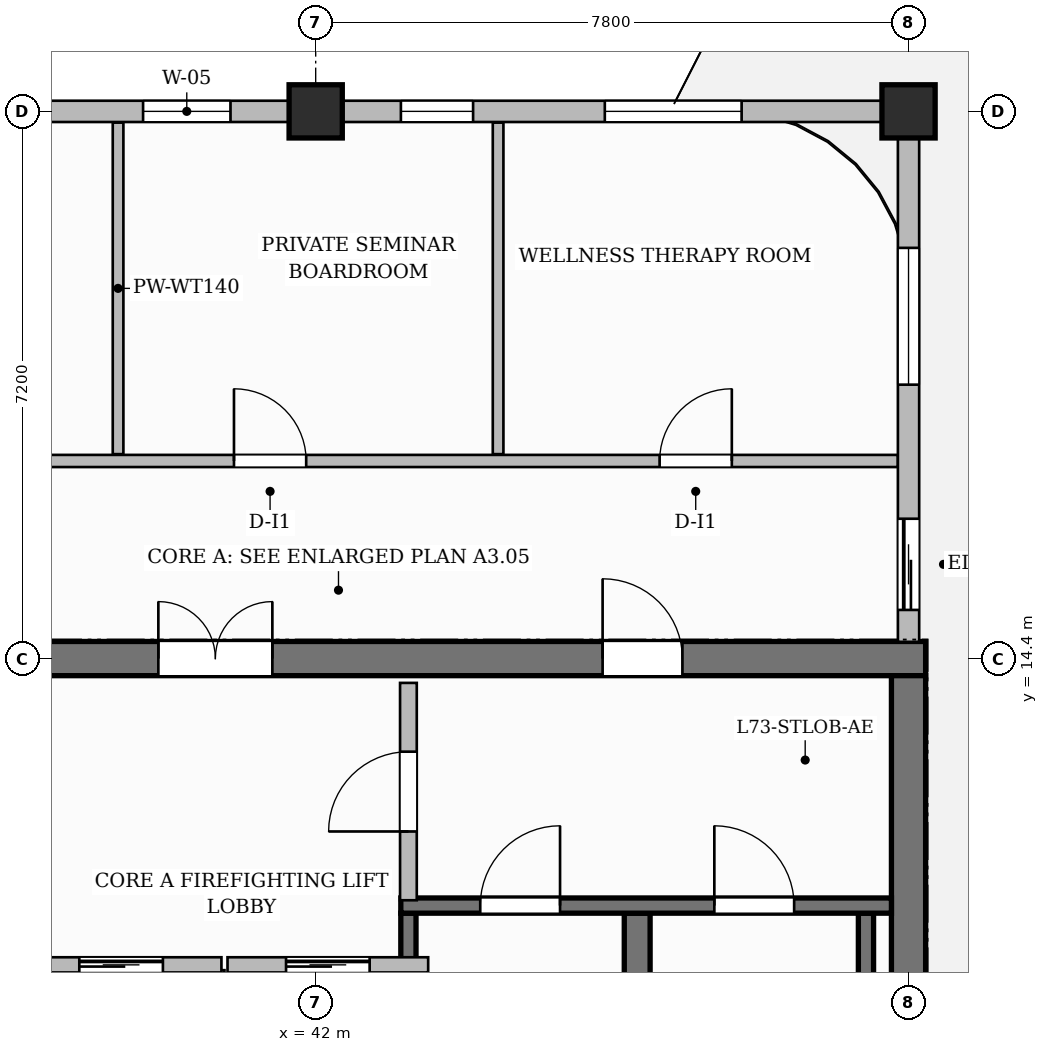
"""IFC4 building model, lengths in metres.
Left out: names, types, materials, properties, quantities, classifications, styles, units other than length and angle.
Written with IfcOpenShell. Run it as: python <this file> out.ifc"""

import sys

from ifc_helpers import new_model, si_unit, direction, frame, frame_2d, origin, origin_2d, place, context, subcontext, project, spatial, rectangle, extrude, source, transform, mapped, element, fill, save


model = new_model("IFC4")
c1 = context("Model", 3, precision=1e-05, world=origin(), true_north=direction((0.0, 1.0)))
c2 = subcontext(c1, "Body", "Model", "MODEL_VIEW")
j1 = project(units=[si_unit("LENGTHUNIT", "METRE"), si_unit("PLANEANGLEUNIT", "RADIAN")], contexts=[c1])
p1 = place(None, origin())
s1 = spatial("IfcSite", under=j1, at=p1, CompositionType="ELEMENT")
p2 = place(p1, origin())
s2 = spatial("IfcBuilding", under=s1, at=p2, CompositionType="ELEMENT")
p3 = place(p2, frame((0.0, 0.0, 290.45)))
s3 = spatial("IfcBuildingStorey", under=s2, at=p3, CompositionType="ELEMENT", Elevation=290.45)
p4 = place(p3, frame((34.575, 14.4, 0.0), z_axis=(0.0, 0.0, 1.0), x_axis=(1.0, 0.0, 0.0)))
e1 = element("IfcWall", 1, at=p4, inside=s3, PredefinedType="SHEAR", context=c2, shape_type="SweptSolid", body=[
    extrude(rectangle(XDim=15.45, YDim=0.45, at=frame_2d((7.725, 0.0))), origin(), (0.0, 0.0, 1.0), 3.85),
])
p5 = place(p4, frame((5.355, 0.0, 0.0)))
e2 = element("IfcOpeningElement", 2, at=p5, cuts=e1, PredefinedType="OPENING", context=c2, shape_type="SweptSolid", body=[
    extrude(rectangle(XDim=1.5, YDim=2.2, at=frame_2d((0.75, 1.1))), frame((0.0, 0.235, 0.0), z_axis=(0.0, -1.0, 0.0), x_axis=(1.0, 0.0, 0.0)), (0.0, 0.0, 1.0), 0.47),
])
p6 = place(p4, frame((1.57, 0.0, 0.0)))
e3 = element("IfcOpeningElement", 3, at=p6, cuts=e1, PredefinedType="OPENING", context=c2, shape_type="SweptSolid", body=[
    extrude(rectangle(XDim=1.05, YDim=2.15, at=frame_2d((0.525, 1.075))), frame((0.0, 0.235, 0.0), z_axis=(0.0, -1.0, 0.0), x_axis=(1.0, 0.0, 0.0)), (0.0, 0.0, 1.0), 0.47),
])
p7 = place(p4, frame((11.2, 0.0, 0.0)))
e4 = element("IfcOpeningElement", 4, at=p7, cuts=e1, PredefinedType="OPENING", context=c2, shape_type="SweptSolid", body=[
    extrude(rectangle(XDim=1.05, YDim=2.15, at=frame_2d((0.525, 1.075))), frame((0.0, 0.235, 0.0), z_axis=(0.0, -1.0, 0.0), x_axis=(1.0, 0.0, 0.0)), (0.0, 0.0, 1.0), 0.47),
])
p8 = place(p3, frame((49.8, 3.825, 0.0), z_axis=(0.0, 0.0, 1.0), x_axis=(0.0, 1.0, 0.0)))
e5 = element("IfcWall", 5, at=p8, inside=s3, PredefinedType="SHEAR", context=c2, shape_type="SweptSolid", body=[
    extrude(rectangle(XDim=10.35, YDim=0.45, at=frame_2d((5.175, 0.0))), origin(), (0.0, 0.0, 1.0), 3.85),
])
m1 = source(origin(), c2, "Body", "SweptSolid", [
    extrude(rectangle(XDim=0.7, YDim=0.7, at=origin_2d()), origin(), (0.0, 0.0, 1.0), 3.85),
])
for number, where, z_axis, x_axis in (
    (6, (42.0, 21.6, 0.0), (0.0, 0.0, 1.0), (1.0, 0.0, 0.0)),
    (7, (49.8, 21.6, 0.0), (0.0, 0.0, 1.0), (1.0, 0.0, 0.0)),
):
    element("IfcColumn", number, at=place(p3, frame(where, z_axis=z_axis, x_axis=x_axis)), inside=s3, PredefinedType="COLUMN", context=c2, shape_type="MappedRepresentation", body=[
        mapped(m1, transform((0.0, 0.0, 0.0), scale=1.0)),
    ])
p9 = place(p3, frame((43.22, 4.1, 0.0), z_axis=(0.0, 0.0, 1.0), x_axis=(0.0, 1.0, 0.0)))
e8 = element("IfcWall", 8, at=p9, inside=s3, PredefinedType="SHEAR", context=c2, shape_type="SweptSolid", body=[
    extrude(rectangle(XDim=6.95, YDim=0.2, at=frame_2d((3.475, 0.0))), origin(), (0.0, 0.0, 1.0), 3.85),
])
p10 = place(p3, frame((46.23, 4.1, 0.0), z_axis=(0.0, 0.0, 1.0), x_axis=(0.0, 1.0, 0.0)))
e9 = element("IfcWall", 9, at=p10, inside=s3, PredefinedType="SHEAR", context=c2, shape_type="SweptSolid", body=[
    extrude(rectangle(XDim=6.95, YDim=0.34, at=frame_2d((3.475, 0.0))), origin(), (0.0, 0.0, 1.0), 3.85),
])
p11 = place(p3, frame((49.24, 4.1, 0.0), z_axis=(0.0, 0.0, 1.0), x_axis=(0.0, 1.0, 0.0)))
e10 = element("IfcWall", 10, at=p11, inside=s3, PredefinedType="SHEAR", context=c2, shape_type="SweptSolid", body=[
    extrude(rectangle(XDim=6.95, YDim=0.2, at=frame_2d((3.475, 0.0))), origin(), (0.0, 0.0, 1.0), 3.85),
])
p12 = place(p3, frame((43.12, 11.15, 0.0), z_axis=(0.0, 0.0, 1.0), x_axis=(1.0, 0.0, 0.0)))
e11 = element("IfcWall", 11, at=p12, inside=s3, PredefinedType="SHEAR", context=c2, shape_type="SweptSolid", body=[
    extrude(rectangle(XDim=6.455, YDim=0.2, at=frame_2d((3.228, 0.0))), origin(), (0.0, 0.0, 1.0), 3.85),
])
p13 = place(p12, frame((1.045, 0.0, 0.0)))
e12 = element("IfcOpeningElement", 12, at=p13, cuts=e11, PredefinedType="OPENING", context=c2, shape_type="SweptSolid", body=[
    extrude(rectangle(XDim=1.05, YDim=2.2, at=frame_2d((0.525, 1.1))), frame((0.0, 0.11, 0.0), z_axis=(0.0, -1.0, 0.0), x_axis=(1.0, 0.0, 0.0)), (0.0, 0.0, 1.0), 0.22),
])
p14 = place(p12, frame((4.125, 0.0, 0.0)))
e13 = element("IfcOpeningElement", 13, at=p14, cuts=e11, PredefinedType="OPENING", context=c2, shape_type="SweptSolid", body=[
    extrude(rectangle(XDim=1.05, YDim=2.2, at=frame_2d((0.525, 1.1))), frame((0.0, 0.11, 0.0), z_axis=(0.0, -1.0, 0.0), x_axis=(1.0, 0.0, 0.0)), (0.0, 0.0, 1.0), 0.22),
])
p15 = place(p3, frame((40.7, 8.12, 0.0), z_axis=(0.0, 0.0, 1.0), x_axis=(0.0, 1.0, 0.0)))
e14 = element("IfcWall", 14, at=p15, inside=s3, PredefinedType="PARTITIONING", context=c2, shape_type="SweptSolid", body=[
    extrude(rectangle(XDim=2.18, YDim=0.2, at=frame_2d((1.09, 0.0))), origin(), (0.0, 0.0, 1.0), 3.55),
])
p16 = place(p3, frame((43.22, 11.22, 0.0), z_axis=(0.0, 0.0, 1.0), x_axis=(0.0, 1.0, 0.0)))
e15 = element("IfcWall", 15, at=p16, inside=s3, PredefinedType="PARTITIONING", context=c2, shape_type="SweptSolid", body=[
    extrude(rectangle(XDim=2.86, YDim=0.22, at=frame_2d((1.43, 0.0))), origin(), (0.0, 0.0, 1.0), 3.55),
])
p17 = place(p16, frame((0.905, 0.0, 0.0)))
e16 = element("IfcOpeningElement", 16, at=p17, cuts=e15, PredefinedType="OPENING", context=c2, shape_type="SweptSolid", body=[
    extrude(rectangle(XDim=1.05, YDim=2.15, at=frame_2d((0.525, 1.075))), frame((0.0, 0.12, 0.0), z_axis=(0.0, -1.0, 0.0), x_axis=(1.0, 0.0, 0.0)), (0.0, 0.0, 1.0), 0.24),
])
p18 = place(p3, frame((30.29, 17.0, 0.0), z_axis=(0.0, 0.0, 1.0), x_axis=(1.0, 0.0, 0.0)))
e17 = element("IfcWall", 17, at=p18, inside=s3, PredefinedType="PARTITIONING", context=c2, shape_type="SweptSolid", body=[
    extrude(rectangle(XDim=19.37, YDim=0.16, at=frame_2d((9.685, 0.0))), origin(), (0.0, 0.0, 1.0), 3.55),
])
p19 = place(p18, frame((1.135, 0.0, 0.0)))
e18 = element("IfcOpeningElement", 18, at=p19, cuts=e17, PredefinedType="OPENING", context=c2, shape_type="SweptSolid", body=[
    extrude(rectangle(XDim=0.85, YDim=2.1, at=frame_2d((0.425, 1.05))), frame((0.0, 0.09, 0.0), z_axis=(0.0, -1.0, 0.0), x_axis=(1.0, 0.0, 0.0)), (0.0, 0.0, 1.0), 0.18),
])
p20 = place(p18, frame((5.71, 0.0, 0.0)))
e19 = element("IfcOpeningElement", 19, at=p20, cuts=e17, PredefinedType="OPENING", context=c2, shape_type="SweptSolid", body=[
    extrude(rectangle(XDim=0.9, YDim=2.15, at=frame_2d((0.45, 1.075))), frame((0.0, 0.09, 0.0), z_axis=(0.0, -1.0, 0.0), x_axis=(1.0, 0.0, 0.0)), (0.0, 0.0, 1.0), 0.18),
])
p21 = place(p18, frame((10.635, 0.0, 0.0)))
e20 = element("IfcOpeningElement", 20, at=p21, cuts=e17, PredefinedType="OPENING", context=c2, shape_type="SweptSolid", body=[
    extrude(rectangle(XDim=0.95, YDim=2.15, at=frame_2d((0.475, 1.075))), frame((0.0, 0.09, 0.0), z_axis=(0.0, -1.0, 0.0), x_axis=(1.0, 0.0, 0.0)), (0.0, 0.0, 1.0), 0.18),
])
p22 = place(p18, frame((16.235, 0.0, 0.0)))
e21 = element("IfcOpeningElement", 21, at=p22, cuts=e17, PredefinedType="OPENING", context=c2, shape_type="SweptSolid", body=[
    extrude(rectangle(XDim=0.95, YDim=2.15, at=frame_2d((0.475, 1.075))), frame((0.0, 0.09, 0.0), z_axis=(0.0, -1.0, 0.0), x_axis=(1.0, 0.0, 0.0)), (0.0, 0.0, 1.0), 0.18),
])
for number, where, z_axis, x_axis in (
    (22, (39.4, 17.09, 0.0), (0.0, 0.0, 1.0), (0.0, 1.0, 0.0)),
    (23, (44.4, 17.09, 0.0), (0.0, 0.0, 1.0), (0.0, 1.0, 0.0)),
):
    element("IfcWall", number, at=place(p3, frame(where, z_axis=z_axis, x_axis=x_axis)), inside=s3, PredefinedType="PARTITIONING", context=c2, shape_type="SweptSolid", body=[
        extrude(rectangle(XDim=4.362, YDim=0.14, at=frame_2d((2.181, 0.0))), origin(), (0.0, 0.0, 1.0), 3.55),
    ])
p23 = place(p3, frame((38.12, 10.37, 0.0), z_axis=(0.0, 0.0, 1.0), x_axis=(1.0, 0.0, 0.0)))
e24 = element("IfcWall", 24, at=p23, inside=s3, PredefinedType="PARTITIONING", context=c2, shape_type="SweptSolid", body=[
    extrude(rectangle(XDim=2.64, YDim=0.2, at=frame_2d((1.32, 0.0))), origin(), (0.0, 0.0, 1.0), 3.55),
])
p24 = place(p23, frame((0.77, 0.0, 0.0)))
e25 = element("IfcOpeningElement", 25, at=p24, cuts=e24, PredefinedType="OPENING", context=c2, shape_type="SweptSolid", body=[
    extrude(rectangle(XDim=1.1, YDim=2.2, at=frame_2d((0.55, 1.1))), frame((0.0, 0.11, 0.0), z_axis=(0.0, -1.0, 0.0), x_axis=(1.0, 0.0, 0.0)), (0.0, 0.0, 1.0), 0.22),
])
p25 = place(p3, frame((40.84, 10.37, 0.0), z_axis=(0.0, 0.0, 1.0), x_axis=(1.0, 0.0, 0.0)))
e26 = element("IfcWall", 26, at=p25, inside=s3, PredefinedType="PARTITIONING", context=c2, shape_type="SweptSolid", body=[
    extrude(rectangle(XDim=2.64, YDim=0.2, at=frame_2d((1.32, 0.0))), origin(), (0.0, 0.0, 1.0), 3.55),
])
p26 = place(p25, frame((0.77, 0.0, 0.0)))
e27 = element("IfcOpeningElement", 27, at=p26, cuts=e26, PredefinedType="OPENING", context=c2, shape_type="SweptSolid", body=[
    extrude(rectangle(XDim=1.1, YDim=2.2, at=frame_2d((0.55, 1.1))), frame((0.0, 0.11, 0.0), z_axis=(0.0, -1.0, 0.0), x_axis=(1.0, 0.0, 0.0)), (0.0, 0.0, 1.0), 0.22),
])
p27 = place(p3, frame((49.8, 14.62, 0.0), z_axis=(0.0, 0.0, 1.0), x_axis=(0.0, 1.0, 0.0)))
e28 = element("IfcWall", 28, at=p27, inside=s3, PredefinedType="SOLIDWALL", context=c2, shape_type="SweptSolid", body=[
    extrude(rectangle(XDim=6.93, YDim=0.28, at=frame_2d((3.465, 0.0))), origin(), (0.0, 0.0, 1.0), 3.135),
])
p28 = place(p27, frame((0.42, 0.0, 0.0)))
e29 = element("IfcOpeningElement", 29, at=p28, cuts=e28, PredefinedType="OPENING", context=c2, shape_type="SweptSolid", body=[
    extrude(rectangle(XDim=1.2, YDim=2.2, at=frame_2d((0.6, 1.1))), frame((0.0, 0.15, 0.0), z_axis=(0.0, -1.0, 0.0), x_axis=(1.0, 0.0, 0.0)), (0.0, 0.0, 1.0), 0.3),
])
p29 = place(p27, frame((3.384, 0.0, 0.8)))
e30 = element("IfcOpeningElement", 30, at=p29, cuts=e28, PredefinedType="OPENING", context=c2, shape_type="SweptSolid", body=[
    extrude(rectangle(XDim=1.8, YDim=1.85, at=frame_2d((0.9, 0.925))), frame((0.0, 0.15, 0.0), z_axis=(0.0, -1.0, 0.0), x_axis=(1.0, 0.0, 0.0)), (0.0, 0.0, 1.0), 0.3),
])
p30 = place(p3, frame((18.0, 21.6, 0.0), z_axis=(0.0, 0.0, 1.0), x_axis=(1.0, 0.0, 0.0)))
e31 = element("IfcWall", 31, at=p30, inside=s3, PredefinedType="SOLIDWALL", context=c2, shape_type="SweptSolid", body=[
    extrude(rectangle(XDim=31.8, YDim=0.28, at=frame_2d((15.9, 0.0))), origin(), (0.0, 0.0, 1.0), 3.135),
])
p31 = place(p30, frame((0.42, 0.0, 0.0)))
e32 = element("IfcOpeningElement", 32, at=p31, cuts=e31, PredefinedType="OPENING", context=c2, shape_type="SweptSolid", body=[
    extrude(rectangle(XDim=1.2, YDim=2.2, at=frame_2d((0.6, 1.1))), frame((0.0, 0.15, 0.0), z_axis=(0.0, -1.0, 0.0), x_axis=(1.0, 0.0, 0.0)), (0.0, 0.0, 1.0), 0.3),
])
p32 = place(p30, frame((4.581, 0.0, 0.8)))
e33 = element("IfcOpeningElement", 33, at=p32, cuts=e31, PredefinedType="OPENING", context=c2, shape_type="SweptSolid", body=[
    extrude(rectangle(XDim=0.95, YDim=1.75, at=frame_2d((0.475, 0.875))), frame((0.0, 0.15, 0.0), z_axis=(0.0, -1.0, 0.0), x_axis=(1.0, 0.0, 0.0)), (0.0, 0.0, 1.0), 0.3),
])
p33 = place(p30, frame((6.964, 0.0, 0.8)))
e34 = element("IfcOpeningElement", 34, at=p33, cuts=e31, PredefinedType="OPENING", context=c2, shape_type="SweptSolid", body=[
    extrude(rectangle(XDim=1.8, YDim=1.85, at=frame_2d((0.9, 0.925))), frame((0.0, 0.15, 0.0), z_axis=(0.0, -1.0, 0.0), x_axis=(1.0, 0.0, 0.0)), (0.0, 0.0, 1.0), 0.3),
])
p34 = place(p30, frame((12.95, 0.0, 0.8)))
e35 = element("IfcOpeningElement", 35, at=p34, cuts=e31, PredefinedType="OPENING", context=c2, shape_type="SweptSolid", body=[
    extrude(rectangle(XDim=1.8, YDim=1.85, at=frame_2d((0.9, 0.925))), frame((0.0, 0.15, 0.0), z_axis=(0.0, -1.0, 0.0), x_axis=(1.0, 0.0, 0.0)), (0.0, 0.0, 1.0), 0.3),
])
p35 = place(p30, frame((18.596, 0.0, 0.8)))
e36 = element("IfcOpeningElement", 36, at=p35, cuts=e31, PredefinedType="OPENING", context=c2, shape_type="SweptSolid", body=[
    extrude(rectangle(XDim=1.8, YDim=1.85, at=frame_2d((0.9, 0.925))), frame((0.0, 0.15, 0.0), z_axis=(0.0, -1.0, 0.0), x_axis=(1.0, 0.0, 0.0)), (0.0, 0.0, 1.0), 0.3),
])
p36 = place(p30, frame((21.729, 0.0, 0.8)))
e37 = element("IfcOpeningElement", 37, at=p36, cuts=e31, PredefinedType="OPENING", context=c2, shape_type="SweptSolid", body=[
    extrude(rectangle(XDim=1.15, YDim=1.8, at=frame_2d((0.575, 0.9))), frame((0.0, 0.15, 0.0), z_axis=(0.0, -1.0, 0.0), x_axis=(1.0, 0.0, 0.0)), (0.0, 0.0, 1.0), 0.3),
])
p37 = place(p30, frame((25.121, 0.0, 0.8)))
e38 = element("IfcOpeningElement", 38, at=p37, cuts=e31, PredefinedType="OPENING", context=c2, shape_type="SweptSolid", body=[
    extrude(rectangle(XDim=0.95, YDim=1.75, at=frame_2d((0.475, 0.875))), frame((0.0, 0.15, 0.0), z_axis=(0.0, -1.0, 0.0), x_axis=(1.0, 0.0, 0.0)), (0.0, 0.0, 1.0), 0.3),
])
p38 = place(p30, frame((27.804, 0.0, 0.8)))
e39 = element("IfcOpeningElement", 39, at=p38, cuts=e31, PredefinedType="OPENING", context=c2, shape_type="SweptSolid", body=[
    extrude(rectangle(XDim=1.8, YDim=1.85, at=frame_2d((0.9, 0.925))), frame((0.0, 0.15, 0.0), z_axis=(0.0, -1.0, 0.0), x_axis=(1.0, 0.0, 0.0)), (0.0, 0.0, 1.0), 0.3),
])
m2 = source(origin(), c2, "Body", "SweptSolid", [
    extrude(rectangle(XDim=1.05, YDim=2.2, at=frame_2d((0.525, 1.1))), frame((0.0, 0.025, 0.0), z_axis=(0.0, -1.0, 0.0), x_axis=(1.0, 0.0, 0.0)), (0.0, 0.0, 1.0), 0.05),
])
p39 = place(p13, origin())
e40 = element("IfcDoor", 40, at=p39, inside=s3, OperationType="SINGLE_SWING_RIGHT", PredefinedType="DOOR", context=c2, shape_type="MappedRepresentation", body=[
    mapped(m2, transform((0.0, 0.0, 0.0), scale=1.0)),
])
fill(e12, e40)
p40 = place(p14, origin())
e41 = element("IfcDoor", 41, at=p40, inside=s3, OperationType="SINGLE_SWING_LEFT", PredefinedType="DOOR", context=c2, shape_type="MappedRepresentation", body=[
    mapped(m2, transform((0.0, 0.0, 0.0), scale=1.0)),
])
fill(e13, e41)
m3 = source(origin(), c2, "Body", "SweptSolid", [
    extrude(rectangle(XDim=1.05, YDim=2.15, at=frame_2d((0.525, 1.075))), frame((0.0, 0.025, 0.0), z_axis=(0.0, -1.0, 0.0), x_axis=(1.0, 0.0, 0.0)), (0.0, 0.0, 1.0), 0.05),
])
p41 = place(p17, origin())
e42 = element("IfcDoor", 42, at=p41, inside=s3, OperationType="SINGLE_SWING_LEFT", PredefinedType="DOOR", context=c2, shape_type="MappedRepresentation", body=[
    mapped(m3, transform((0.0, 0.0, 0.0), scale=1.0)),
])
fill(e16, e42)
m4 = source(origin(), c2, "Body", "SweptSolid", [
    extrude(rectangle(XDim=1.5, YDim=2.2, at=frame_2d((0.75, 1.1))), frame((0.0, 0.025, 0.0), z_axis=(0.0, -1.0, 0.0), x_axis=(1.0, 0.0, 0.0)), (0.0, 0.0, 1.0), 0.05),
])
p42 = place(p5, origin())
e43 = element("IfcDoor", 43, at=p42, inside=s3, OperationType="DOUBLE_DOOR_SINGLE_SWING", PredefinedType="DOOR", context=c2, shape_type="MappedRepresentation", body=[
    mapped(m4, transform((0.0, 0.0, 0.0), scale=1.0)),
])
fill(e2, e43)
p43 = place(p7, origin())
e44 = element("IfcDoor", 44, at=p43, inside=s3, OperationType="SINGLE_SWING_LEFT", PredefinedType="DOOR", context=c2, shape_type="MappedRepresentation", body=[
    mapped(m3, transform((0.0, 0.0, 0.0), scale=1.0)),
])
fill(e4, e44)
m5 = source(origin(), c2, "Body", "SweptSolid", [
    extrude(rectangle(XDim=0.95, YDim=2.15, at=frame_2d((0.475, 1.075))), frame((0.0, 0.025, 0.0), z_axis=(0.0, -1.0, 0.0), x_axis=(1.0, 0.0, 0.0)), (0.0, 0.0, 1.0), 0.05),
])
p44 = place(p21, origin())
e45 = element("IfcDoor", 45, at=p44, inside=s3, OperationType="SINGLE_SWING_LEFT", PredefinedType="DOOR", context=c2, shape_type="MappedRepresentation", body=[
    mapped(m5, transform((0.0, 0.0, 0.0), scale=1.0)),
])
fill(e20, e45)
p45 = place(p22, origin())
e46 = element("IfcDoor", 46, at=p45, inside=s3, OperationType="SINGLE_SWING_RIGHT", PredefinedType="DOOR", context=c2, shape_type="MappedRepresentation", body=[
    mapped(m5, transform((0.0, 0.0, 0.0), scale=1.0)),
])
fill(e21, e46)
m6 = source(origin(), c2, "Body", "SweptSolid", [
    extrude(rectangle(XDim=1.1, YDim=2.2, at=frame_2d((0.55, 1.1))), frame((0.0, 0.025, 0.0), z_axis=(0.0, -1.0, 0.0), x_axis=(1.0, 0.0, 0.0)), (0.0, 0.0, 1.0), 0.05),
])
p46 = place(p24, origin())
e47 = element("IfcDoor", 47, at=p46, inside=s3, OperationType="SLIDING_TO_LEFT", PredefinedType="DOOR", context=c2, shape_type="MappedRepresentation", body=[
    mapped(m6, transform((0.0, 0.0, 0.0), scale=1.0)),
])
fill(e25, e47)
p47 = place(p26, origin())
e48 = element("IfcDoor", 48, at=p47, inside=s3, OperationType="SLIDING_TO_LEFT", PredefinedType="DOOR", context=c2, shape_type="MappedRepresentation", body=[
    mapped(m6, transform((0.0, 0.0, 0.0), scale=1.0)),
])
fill(e27, e48)
m7 = source(origin(), c2, "Body", "SweptSolid", [
    extrude(rectangle(XDim=1.2, YDim=2.2, at=frame_2d((0.6, 1.1))), frame((0.0, 0.025, 0.0), z_axis=(0.0, -1.0, 0.0), x_axis=(1.0, 0.0, 0.0)), (0.0, 0.0, 1.0), 0.05),
])
p48 = place(p28, origin())
e49 = element("IfcDoor", 49, at=p48, inside=s3, OperationType="SLIDING_TO_LEFT", PredefinedType="DOOR", context=c2, shape_type="MappedRepresentation", body=[
    mapped(m7, transform((0.0, 0.0, 0.0), scale=1.0)),
])
fill(e29, e49)
m8 = source(origin(), c2, "Body", "SweptSolid", [
    extrude(rectangle(XDim=1.8, YDim=1.85, at=frame_2d((0.9, 0.925))), frame((0.0, 0.03, 0.0), z_axis=(0.0, -1.0, 0.0), x_axis=(1.0, 0.0, 0.0)), (0.0, 0.0, 1.0), 0.06),
])
p49 = place(p29, origin())
e50 = element("IfcWindow", 50, at=p49, inside=s3, PartitioningType="DOUBLE_PANEL_VERTICAL", PredefinedType="WINDOW", context=c2, shape_type="MappedRepresentation", body=[
    mapped(m8, transform((0.0, 0.0, 0.0), scale=1.0)),
])
fill(e30, e50)
m9 = source(origin(), c2, "Body", "SweptSolid", [
    extrude(rectangle(XDim=1.15, YDim=1.8, at=frame_2d((0.575, 0.9))), frame((0.0, 0.03, 0.0), z_axis=(0.0, -1.0, 0.0), x_axis=(1.0, 0.0, 0.0)), (0.0, 0.0, 1.0), 0.06),
])
p50 = place(p36, origin())
e51 = element("IfcWindow", 51, at=p50, inside=s3, PartitioningType="SINGLE_PANEL", PredefinedType="WINDOW", context=c2, shape_type="MappedRepresentation", body=[
    mapped(m9, transform((0.0, 0.0, 0.0), scale=1.0)),
])
fill(e37, e51)
m10 = source(origin(), c2, "Body", "SweptSolid", [
    extrude(rectangle(XDim=0.95, YDim=1.75, at=frame_2d((0.475, 0.875))), frame((0.0, 0.03, 0.0), z_axis=(0.0, -1.0, 0.0), x_axis=(1.0, 0.0, 0.0)), (0.0, 0.0, 1.0), 0.06),
])
p51 = place(p37, origin())
e52 = element("IfcWindow", 52, at=p51, inside=s3, PartitioningType="SINGLE_PANEL", PredefinedType="WINDOW", context=c2, shape_type="MappedRepresentation", body=[
    mapped(m10, transform((0.0, 0.0, 0.0), scale=1.0)),
])
fill(e38, e52)
p52 = place(p38, origin())
e53 = element("IfcWindow", 53, at=p52, inside=s3, PartitioningType="DOUBLE_PANEL_VERTICAL", PredefinedType="WINDOW", context=c2, shape_type="MappedRepresentation", body=[
    mapped(m8, transform((0.0, 0.0, 0.0), scale=1.0)),
])
fill(e39, e53)
save(model, sys.argv[1])
